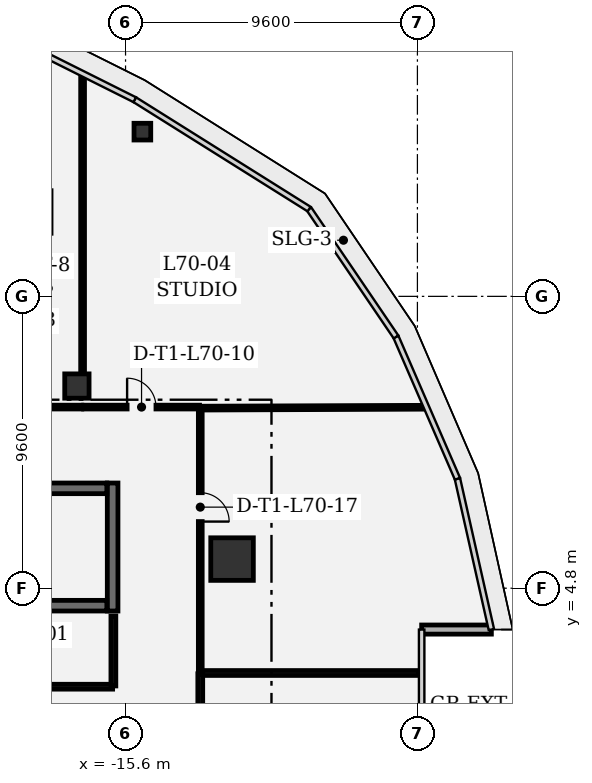
"""IFC4 building model, lengths in metres.
Left out: names, types, materials, properties, quantities, classifications, styles, units other than length and angle.
Written with IfcOpenShell. Run it as: python <this file> out.ifc"""

import sys

from ifc_helpers import new_model, si_unit, direction, frame, frame_2d, origin, origin_2d, place, context, subcontext, project, spatial, rectangle, extrude, element, fill, save


model = new_model("IFC4")
c1 = context("Model", 3, precision=1e-05, world=origin(), true_north=direction((0.0, 1.0)))
c2 = subcontext(c1, "Body", "Model", "MODEL_VIEW")
j1 = project(units=[si_unit("LENGTHUNIT", "METRE"), si_unit("PLANEANGLEUNIT", "RADIAN")], contexts=[c1])
p1 = place(None, origin())
s1 = spatial("IfcSite", under=j1, at=p1, CompositionType="ELEMENT")
p2 = place(p1, origin())
s2 = spatial("IfcBuilding", under=s1, at=p2, CompositionType="ELEMENT")
p3 = place(p2, frame((0.0, 0.0, 301.8)))
s3 = spatial("IfcBuildingStorey", under=s2, at=p3, CompositionType="ELEMENT", Elevation=301.8)
p4 = place(p3, frame((-12.097, 5.758, 0.0), z_axis=(0.0, 0.0, 1.0), x_axis=(1.0, 0.0, 0.0)))
e1 = element("IfcColumn", 1, at=p4, inside=s3, PredefinedType="COLUMN", context=c2, shape_type="SweptSolid", body=[
    extrude(rectangle(XDim=1.4, YDim=1.4, at=origin_2d()), origin(), (0.0, 0.0, 1.0), 4.2),
])
p5 = place(p3, frame((-17.2, 11.45, 0.0), z_axis=(0.0, 0.0, 1.0), x_axis=(1.0, 0.0, 0.0)))
e2 = element("IfcColumn", 2, at=p5, inside=s3, PredefinedType="COLUMN", context=c2, shape_type="SweptSolid", body=[
    extrude(rectangle(XDim=0.8, YDim=0.8, at=origin_2d()), origin(), (0.0, 0.0, 1.0), 4.2),
])
p6 = place(p3, frame((-15.046, 19.818, 0.0), z_axis=(0.0, 0.0, 1.0), x_axis=(1.0, 0.0, 0.0)))
e3 = element("IfcColumn", 3, at=p6, inside=s3, PredefinedType="COLUMN", context=c2, shape_type="SweptSolid", body=[
    extrude(rectangle(XDim=0.55, YDim=0.55, at=origin_2d()), origin(), (0.0, 0.0, 1.0), 4.2),
])
p7 = place(p3, frame((-5.861, 3.44, 0.0), z_axis=(0.0, 0.0, 1.0), x_axis=(1.0, 0.0, 0.0)))
e4 = element("IfcWall", 4, at=p7, inside=s3, PredefinedType="SOLIDWALL", context=c2, shape_type="SweptSolid", body=[
    extrude(rectangle(XDim=2.293, YDim=0.3, at=frame_2d((1.146, 0.0))), origin(), (0.0, 0.0, 1.0), 3.91),
])
p8 = place(p3, frame((-16.025, 4.05, 0.0), z_axis=(0.0, 0.0, 1.0), x_axis=(0.0, 1.0, 0.0)))
e5 = element("IfcWall", 5, at=p8, inside=s3, PredefinedType="SHEAR", context=c2, shape_type="SweptSolid", body=[
    extrude(rectangle(XDim=4.21, YDim=0.35, at=frame_2d((2.105, 0.0))), origin(), (0.0, 0.0, 1.0), 3.91),
])
p9 = place(p3, frame((-24.335, 4.225, 0.0), z_axis=(0.0, 0.0, 1.0), x_axis=(1.0, 0.0, 0.0)))
e6 = element("IfcWall", 6, at=p9, inside=s3, PredefinedType="SHEAR", context=c2, shape_type="SweptSolid", body=[
    extrude(rectangle(XDim=8.12, YDim=0.35, at=frame_2d((4.06, 0.0))), origin(), (0.0, 0.0, 1.0), 3.91),
])
p10 = place(p3, frame((-16.215, 8.085, 0.0), z_axis=(0.0, 0.0, 1.0), x_axis=(-1.0, 0.0, 0.0)))
e7 = element("IfcWall", 7, at=p10, inside=s3, PredefinedType="SHEAR", context=c2, shape_type="SweptSolid", body=[
    extrude(rectangle(XDim=8.12, YDim=0.35, at=frame_2d((4.06, 0.0))), origin(), (0.0, 0.0, 1.0), 3.91),
])
p11 = place(p10, frame((6.74, 0.0, 0.0)))
e8 = element("IfcOpeningElement", 8, at=p11, cuts=e7, PredefinedType="OPENING", context=c2, shape_type="SweptSolid", body=[
    extrude(rectangle(XDim=1.1, YDim=2.2, at=frame_2d((0.55, 1.1))), frame((0.0, 0.185, 0.0), z_axis=(0.0, -1.0, 0.0), x_axis=(1.0, 0.0, 0.0)), (0.0, 0.0, 1.0), 0.37),
])
p12 = place(p3, frame((-22.934, 1.56, 0.0), z_axis=(0.0, 0.0, 1.0), x_axis=(1.0, 0.0, 0.0)))
e9 = element("IfcWall", 9, at=p12, inside=s3, PredefinedType="PARTITIONING", context=c2, shape_type="SweptSolid", body=[
    extrude(rectangle(XDim=6.909, YDim=0.16, at=frame_2d((3.455, 0.0))), origin(), (0.0, 0.0, 1.0), 3.91),
])
p13 = place(p12, frame((2.905, 0.0, 0.0)))
e10 = element("IfcOpeningElement", 10, at=p13, cuts=e9, PredefinedType="OPENING", context=c2, shape_type="SweptSolid", body=[
    extrude(rectangle(XDim=1.1, YDim=2.15, at=frame_2d((0.55, 1.075))), frame((0.0, 0.09, 0.0), z_axis=(0.0, -1.0, 0.0), x_axis=(1.0, 0.0, 0.0)), (0.0, 0.0, 1.0), 0.18),
])
p14 = place(p3, frame((-16.0, 1.585, 0.0), z_axis=(0.0, 0.0, 1.0), x_axis=(0.0, 1.0, 0.0)))
e11 = element("IfcWall", 11, at=p14, inside=s3, PredefinedType="PARTITIONING", context=c2, shape_type="SweptSolid", body=[
    extrude(rectangle(XDim=2.302, YDim=0.16, at=frame_2d((1.151, 0.0))), origin(), (0.0, 0.0, 1.0), 3.91),
])
p15 = place(p3, frame((-21.081, 10.758, 0.0), z_axis=(0.0, 0.0, 1.0), x_axis=(1.0, 0.0, 0.0)))
e12 = element("IfcWall", 12, at=p15, inside=s3, PredefinedType="PARTITIONING", context=c2, shape_type="SweptSolid", body=[
    extrude(rectangle(XDim=4.043, YDim=0.125, at=frame_2d((2.021, 0.0))), origin(), (0.0, 0.0, 1.0), 3.529),
])
p16 = place(p15, frame((1.546, 0.0, 0.0)))
e13 = element("IfcOpeningElement", 13, at=p16, cuts=e12, PredefinedType="OPENING", context=c2, shape_type="SweptSolid", body=[
    extrude(rectangle(XDim=0.95, YDim=2.15, at=frame_2d((0.475, 1.075))), frame((0.0, 0.073, 0.0), z_axis=(0.0, -1.0, 0.0), x_axis=(1.0, 0.0, 0.0)), (0.0, 0.0, 1.0), 0.145),
])
p17 = place(p3, frame((-17.013, 11.915, 0.0), z_axis=(0.0, 0.0, 1.0), x_axis=(0.0, 1.0, 0.0)))
e14 = element("IfcWall", 14, at=p17, inside=s3, PredefinedType="PARTITIONING", context=c2, shape_type="SweptSolid", body=[
    extrude(rectangle(XDim=9.731, YDim=0.125, at=frame_2d((4.866, 0.0))), origin(), (0.0, 0.0, 1.0), 3.13),
])
p18 = place(p3, frame((-16.98, 10.758, 0.0), z_axis=(0.0, 0.0, 1.0), x_axis=(1.0, 0.0, 0.0)))
e15 = element("IfcWall", 15, at=p18, inside=s3, PredefinedType="PARTITIONING", context=c2, shape_type="SweptSolid", body=[
    extrude(rectangle(XDim=3.813, YDim=0.125, at=frame_2d((1.906, 0.0))), origin(), (0.0, 0.0, 1.0), 3.91),
])
p19 = place(p18, frame((1.431, 0.0, 0.0)))
e16 = element("IfcOpeningElement", 16, at=p19, cuts=e15, PredefinedType="OPENING", context=c2, shape_type="SweptSolid", body=[
    extrude(rectangle(XDim=0.95, YDim=2.15, at=frame_2d((0.475, 1.075))), frame((0.0, 0.073, 0.0), z_axis=(0.0, -1.0, 0.0), x_axis=(1.0, 0.0, 0.0)), (0.0, 0.0, 1.0), 0.145),
])
p20 = place(p3, frame((-13.117, 10.724, 0.0), z_axis=(0.0, 0.0, 1.0), x_axis=(0.99999241684, 0.003894388469, 0.0)))
e17 = element("IfcWall", 17, at=p20, inside=s3, PredefinedType="PARTITIONING", context=c2, shape_type="SweptSolid", body=[
    extrude(rectangle(XDim=7.335, YDim=0.125, at=frame_2d((3.667, 0.0))), origin(), (0.0, 0.0, 1.0), 3.91),
])
p21 = place(p3, frame((-5.941, 2.011, 0.0), z_axis=(0.0, 0.0, 1.0), x_axis=(-1.0, 0.0, 0.0)))
e18 = element("IfcWall", 18, at=p21, inside=s3, PredefinedType="PARTITIONING", context=c2, shape_type="SweptSolid", body=[
    extrude(rectangle(XDim=7.177, YDim=0.16, at=frame_2d((3.588, 0.0))), origin(), (0.0, 0.0, 1.0), 3.91),
])
p22 = place(p3, frame((-13.142, 1.986, 0.0), z_axis=(0.0, 0.0, 1.0), x_axis=(0.0, -1.0, 0.0)))
e19 = element("IfcWall", 19, at=p22, inside=s3, PredefinedType="PARTITIONING", context=c2, shape_type="SweptSolid", body=[
    extrude(rectangle(XDim=7.485, YDim=0.16, at=frame_2d((3.742, 0.0))), origin(), (0.0, 0.0, 1.0), 3.91),
])
p23 = place(p22, frame((3.192, 0.0, 0.0)))
e20 = element("IfcOpeningElement", 20, at=p23, cuts=e19, PredefinedType="OPENING", context=c2, shape_type="SweptSolid", body=[
    extrude(rectangle(XDim=1.1, YDim=2.15, at=frame_2d((0.55, 1.075))), frame((0.0, 0.09, 0.0), z_axis=(0.0, -1.0, 0.0), x_axis=(1.0, 0.0, 0.0)), (0.0, 0.0, 1.0), 0.18),
])
p24 = place(p3, frame((-13.142, 10.691, 0.0), z_axis=(0.0, 0.0, 1.0), x_axis=(0.0, -1.0, 0.0)))
e21 = element("IfcWall", 21, at=p24, inside=s3, PredefinedType="PARTITIONING", context=c2, shape_type="SweptSolid", body=[
    extrude(rectangle(XDim=8.647, YDim=0.125, at=frame_2d((4.324, 0.0))), origin(), (0.0, 0.0, 1.0), 3.13),
])
p25 = place(p24, frame((2.749, 0.0, 0.0)))
e22 = element("IfcOpeningElement", 22, at=p25, cuts=e21, PredefinedType="OPENING", context=c2, shape_type="SweptSolid", body=[
    extrude(rectangle(XDim=0.95, YDim=2.15, at=frame_2d((0.475, 1.075))), frame((0.0, 0.073, 0.0), z_axis=(0.0, -1.0, 0.0), x_axis=(1.0, 0.0, 0.0)), (0.0, 0.0, 1.0), 0.145),
])
p26 = place(p19, origin())
e23 = element("IfcDoor", 23, at=p26, inside=s3, OperationType="SINGLE_SWING_LEFT", PredefinedType="DOOR", context=c2, shape_type="SweptSolid", body=[
    extrude(rectangle(XDim=0.95, YDim=2.15, at=frame_2d((0.475, 1.075))), frame((0.0, 0.025, 0.0), z_axis=(0.0, -1.0, 0.0), x_axis=(1.0, 0.0, 0.0)), (0.0, 0.0, 1.0), 0.05),
])
fill(e16, e23)
p27 = place(p25, origin())
e24 = element("IfcDoor", 24, at=p27, inside=s3, OperationType="SINGLE_SWING_RIGHT", PredefinedType="DOOR", context=c2, shape_type="SweptSolid", body=[
    extrude(rectangle(XDim=0.95, YDim=2.15, at=frame_2d((0.475, 1.075))), frame((0.0, 0.025, 0.0), z_axis=(0.0, -1.0, 0.0), x_axis=(1.0, 0.0, 0.0)), (0.0, 0.0, 1.0), 0.05),
])
fill(e22, e24)
save(model, sys.argv[1])
